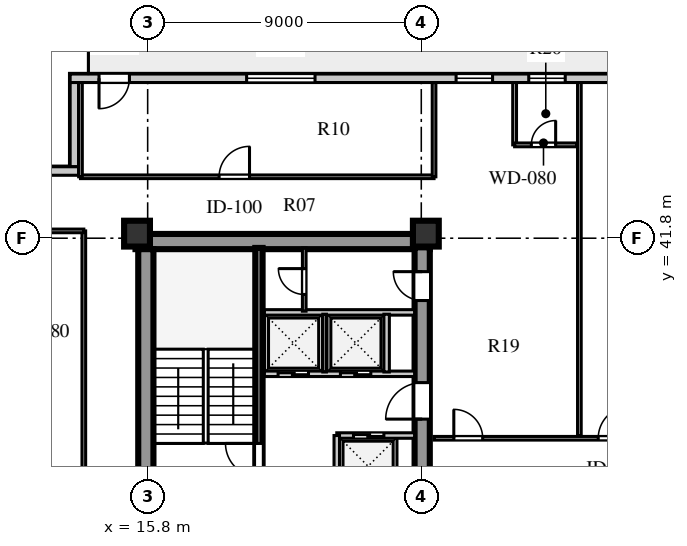
"""IFC4 building model, lengths in metres.
Left out: names, types, materials, properties, quantities, classifications, styles, units other than length and angle.
Written with IfcOpenShell. Run it as: python <this file> out.ifc"""

import sys

from ifc_helpers import new_model, si_unit, direction, frame, frame_2d, origin, origin_2d, place, context, subcontext, project, spatial, rectangle, extrude, element, fill, save


model = new_model("IFC4")
c1 = context("Model", 3, precision=1e-05, world=origin(), true_north=direction((0.0, 1.0)))
c2 = subcontext(c1, "Body", "Model", "MODEL_VIEW")
j1 = project(units=[si_unit("LENGTHUNIT", "METRE"), si_unit("PLANEANGLEUNIT", "RADIAN")], contexts=[c1])
p1 = place(None, origin())
s1 = spatial("IfcSite", under=j1, at=p1, CompositionType="ELEMENT")
p2 = place(p1, origin())
s2 = spatial("IfcBuilding", under=s1, at=p2, CompositionType="ELEMENT")
p3 = place(p2, frame((0.0, 0.0, 111.7)))
s3 = spatial("IfcBuildingStorey", under=s2, at=p3, CompositionType="ELEMENT", Elevation=111.7)
p4 = place(p3, frame((15.4, 41.69, 0.0), z_axis=(0.0, 0.0, 1.0), x_axis=(1.0, 0.0, 0.0)))
e1 = element("IfcWall", 1, at=p4, inside=s3, PredefinedType="SHEAR", context=c2, shape_type="SweptSolid", body=[
    extrude(rectangle(XDim=9.68, YDim=0.5, at=frame_2d((4.84, 0.0))), origin(), (0.0, 0.0, 1.0), 3.6),
])
p5 = place(p3, frame((15.74, 15.81, 0.0), z_axis=(0.0, 0.0, 1.0), x_axis=(0.0, 1.0, 0.0)))
e2 = element("IfcWall", 2, at=p5, inside=s3, PredefinedType="SHEAR", context=c2, shape_type="SweptSolid", body=[
    extrude(rectangle(XDim=25.63, YDim=0.5, at=frame_2d((12.815, 0.0))), origin(), (0.0, 0.0, 1.0), 3.6),
])
p6 = place(p3, frame((24.83, 15.74, 0.0), z_axis=(0.0, 0.0, 1.0), x_axis=(0.0, 1.0, 0.0)))
e3 = element("IfcWall", 3, at=p6, inside=s3, PredefinedType="SHEAR", context=c2, shape_type="SweptSolid", body=[
    extrude(rectangle(XDim=25.76, YDim=0.5, at=frame_2d((12.88, 0.0))), origin(), (0.0, 0.0, 1.0), 3.6),
])
p7 = place(p6, frame((1.61, 0.0, 0.0)))
e4 = element("IfcOpeningElement", 4, at=p7, cuts=e3, PredefinedType="OPENING", context=c2, shape_type="SweptSolid", body=[
    extrude(rectangle(XDim=1.2, YDim=2.1, at=frame_2d((0.6, 1.05))), frame((0.0, 0.26, 0.0), z_axis=(0.0, -1.0, 0.0), x_axis=(1.0, 0.0, 0.0)), (0.0, 0.0, 1.0), 0.52),
])
p8 = place(p6, frame((6.78, 0.0, 0.0)))
e5 = element("IfcOpeningElement", 5, at=p8, cuts=e3, PredefinedType="OPENING", context=c2, shape_type="SweptSolid", body=[
    extrude(rectangle(XDim=0.85, YDim=2.06, at=frame_2d((0.425, 1.03))), frame((0.0, 0.26, 0.0), z_axis=(0.0, -1.0, 0.0), x_axis=(1.0, 0.0, 0.0)), (0.0, 0.0, 1.0), 0.52),
])
p9 = place(p6, frame((12.11, 0.0, 0.0)))
e6 = element("IfcOpeningElement", 6, at=p9, cuts=e3, PredefinedType="OPENING", context=c2, shape_type="SweptSolid", body=[
    extrude(rectangle(XDim=1.5, YDim=2.12, at=frame_2d((0.75, 1.06))), frame((0.0, 0.26, 0.0), z_axis=(0.0, -1.0, 0.0), x_axis=(1.0, 0.0, 0.0)), (0.0, 0.0, 1.0), 0.52),
])
p10 = place(p6, frame((20.11, 0.0, 0.0)))
e7 = element("IfcOpeningElement", 7, at=p10, cuts=e3, PredefinedType="OPENING", context=c2, shape_type="SweptSolid", body=[
    extrude(rectangle(XDim=1.2, YDim=2.12, at=frame_2d((0.6, 1.06))), frame((0.0, 0.26, 0.0), z_axis=(0.0, -1.0, 0.0), x_axis=(1.0, 0.0, 0.0)), (0.0, 0.0, 1.0), 0.52),
])
p11 = place(p6, frame((24.01, 0.0, 0.0)))
e8 = element("IfcOpeningElement", 8, at=p11, cuts=e3, PredefinedType="OPENING", context=c2, shape_type="SweptSolid", body=[
    extrude(rectangle(XDim=0.95, YDim=2.1, at=frame_2d((0.475, 1.05))), frame((0.0, 0.26, 0.0), z_axis=(0.0, -1.0, 0.0), x_axis=(1.0, 0.0, 0.0)), (0.0, 0.0, 1.0), 0.52),
])
for number, where, z_axis, x_axis in (
    (9, (15.45, 41.95, 0.0), (0.0, 0.0, 1.0), (1.0, 0.0, 0.0)),
    (10, (24.95, 41.95, 0.0), (0.0, 0.0, 1.0), (1.0, 0.0, 0.0)),
):
    element("IfcColumn", number, at=place(p3, frame(where, z_axis=z_axis, x_axis=x_axis)), inside=s3, PredefinedType="COLUMN", context=c2, shape_type="SweptSolid", body=[
        extrude(rectangle(XDim=0.85, YDim=0.85, at=origin_2d()), origin(), (0.0, 0.0, 1.0), 3.6),
    ])
p12 = place(p3, frame((45.35, 47.06, 0.0), z_axis=(0.0, 0.0, 1.0), x_axis=(-1.0, 0.0, 0.0)))
e11 = element("IfcWall", 11, at=p12, inside=s3, PredefinedType="STANDARD", context=c2, shape_type="SweptSolid", body=[
    extrude(rectangle(XDim=32.1, YDim=0.28, at=frame_2d((16.05, 0.0))), origin(), (0.0, 0.0, 1.0), 3.6),
])
p13 = place(p12, frame((30.15, 0.0, 0.0)))
e12 = element("IfcOpeningElement", 12, at=p13, cuts=e11, PredefinedType="OPENING", context=c2, shape_type="SweptSolid", body=[
    extrude(rectangle(XDim=1.0, YDim=2.05, at=frame_2d((0.5, 1.025))), frame((0.0, 0.15, 0.0), z_axis=(0.0, -1.0, 0.0), x_axis=(1.0, 0.0, 0.0)), (0.0, 0.0, 1.0), 0.3),
])
p14 = place(p12, frame((24.045, 0.0, 0.8)))
e13 = element("IfcOpeningElement", 13, at=p14, cuts=e11, PredefinedType="OPENING", context=c2, shape_type="SweptSolid", body=[
    extrude(rectangle(XDim=2.25, YDim=2.0, at=frame_2d((1.125, 1.0))), frame((0.0, 0.15, 0.0), z_axis=(0.0, -1.0, 0.0), x_axis=(1.0, 0.0, 0.0)), (0.0, 0.0, 1.0), 0.3),
])
p15 = place(p12, frame((18.205, 0.0, 0.8)))
e14 = element("IfcOpeningElement", 14, at=p15, cuts=e11, PredefinedType="OPENING", context=c2, shape_type="SweptSolid", body=[
    extrude(rectangle(XDim=1.2, YDim=1.75, at=frame_2d((0.6, 0.875))), frame((0.0, 0.15, 0.0), z_axis=(0.0, -1.0, 0.0), x_axis=(1.0, 0.0, 0.0)), (0.0, 0.0, 1.0), 0.3),
])
p16 = place(p12, frame((15.815, 0.0, 0.8)))
e15 = element("IfcOpeningElement", 15, at=p16, cuts=e11, PredefinedType="OPENING", context=c2, shape_type="SweptSolid", body=[
    extrude(rectangle(XDim=1.2, YDim=1.75, at=frame_2d((0.6, 0.875))), frame((0.0, 0.15, 0.0), z_axis=(0.0, -1.0, 0.0), x_axis=(1.0, 0.0, 0.0)), (0.0, 0.0, 1.0), 0.3),
])
p17 = place(p12, frame((12.39, 0.0, 0.8)))
e16 = element("IfcOpeningElement", 16, at=p17, cuts=e11, PredefinedType="OPENING", context=c2, shape_type="SweptSolid", body=[
    extrude(rectangle(XDim=1.2, YDim=1.75, at=frame_2d((0.6, 0.875))), frame((0.0, 0.15, 0.0), z_axis=(0.0, -1.0, 0.0), x_axis=(1.0, 0.0, 0.0)), (0.0, 0.0, 1.0), 0.3),
])
p18 = place(p12, frame((6.38, 0.0, 0.8)))
e17 = element("IfcOpeningElement", 17, at=p18, cuts=e11, PredefinedType="OPENING", context=c2, shape_type="SweptSolid", body=[
    extrude(rectangle(XDim=2.4, YDim=2.05, at=frame_2d((1.2, 1.025))), frame((0.0, 0.15, 0.0), z_axis=(0.0, -1.0, 0.0), x_axis=(1.0, 0.0, 0.0)), (0.0, 0.0, 1.0), 0.3),
])
p19 = place(p12, frame((1.27, 0.0, 0.8)))
e18 = element("IfcOpeningElement", 18, at=p19, cuts=e11, PredefinedType="OPENING", context=c2, shape_type="SweptSolid", body=[
    extrude(rectangle(XDim=2.1, YDim=1.95, at=frame_2d((1.05, 0.975))), frame((0.0, 0.15, 0.0), z_axis=(0.0, -1.0, 0.0), x_axis=(1.0, 0.0, 0.0)), (0.0, 0.0, 1.0), 0.3),
])
p20 = place(p3, frame((13.39, 46.92, 0.0), z_axis=(0.0, 0.0, 1.0), x_axis=(0.0, -1.0, 0.0)))
e19 = element("IfcWall", 19, at=p20, inside=s3, PredefinedType="STANDARD", context=c2, shape_type="SweptSolid", body=[
    extrude(rectangle(XDim=2.77, YDim=0.28, at=frame_2d((1.385, 0.0))), origin(), (0.0, 0.0, 1.0), 3.6),
])
p21 = place(p3, frame((13.53, 44.01, 0.0), z_axis=(0.0, 0.0, 1.0), x_axis=(-1.0, 0.0, 0.0)))
e20 = element("IfcWall", 20, at=p21, inside=s3, PredefinedType="STANDARD", context=c2, shape_type="SweptSolid", body=[
    extrude(rectangle(XDim=3.33, YDim=0.28, at=frame_2d((1.665, 0.0))), origin(), (0.0, 0.0, 1.0), 3.6),
])
p22 = place(p3, frame((19.46, 33.3, 0.0), z_axis=(0.0, 0.0, 1.0), x_axis=(0.0, 1.0, 0.0)))
e21 = element("IfcWall", 21, at=p22, inside=s3, PredefinedType="SHEAR", context=c2, shape_type="SweptSolid", body=[
    extrude(rectangle(XDim=8.18, YDim=0.24, at=frame_2d((4.09, 0.0))), origin(), (0.0, 0.0, 1.0), 3.85),
])
p23 = place(p22, frame((0.65, 0.0, 0.0)))
e22 = element("IfcOpeningElement", 22, at=p23, cuts=e21, PredefinedType="OPENING", context=c2, shape_type="SweptSolid", body=[
    extrude(rectangle(XDim=1.1, YDim=2.1, at=frame_2d((0.55, 1.05))), frame((0.0, 0.13, 0.0), z_axis=(0.0, -1.0, 0.0), x_axis=(1.0, 0.0, 0.0)), (0.0, 0.0, 1.0), 0.26),
])
p24 = place(p3, frame((22.02, 35.31, 0.0), z_axis=(0.0, 0.0, 1.0), x_axis=(1.0, 0.0, 0.0)))
e23 = element("IfcWall", 23, at=p24, inside=s3, PredefinedType="SOLIDWALL", context=c2, shape_type="SweptSolid", body=[
    extrude(rectangle(XDim=2.56, YDim=0.18, at=frame_2d((1.28, 0.0))), origin(), (0.0, 0.0, 1.0), 3.6),
])
p25 = place(p24, frame((0.55, 0.0, 0.0)))
e24 = element("IfcOpeningElement", 24, at=p25, cuts=e23, PredefinedType="OPENING", context=c2, shape_type="SweptSolid", body=[
    extrude(rectangle(XDim=1.0, YDim=2.1, at=frame_2d((0.5, 1.05))), frame((0.0, 0.1, 0.0), z_axis=(0.0, -1.0, 0.0), x_axis=(1.0, 0.0, 0.0)), (0.0, 0.0, 1.0), 0.2),
])
p26 = place(p3, frame((22.02, 33.3, 0.0), z_axis=(0.0, 0.0, 1.0), x_axis=(0.0, 1.0, 0.0)))
e25 = element("IfcWall", 25, at=p26, inside=s3, PredefinedType="SOLIDWALL", context=c2, shape_type="SweptSolid", body=[
    extrude(rectangle(XDim=2.01, YDim=0.18, at=frame_2d((1.005, 0.0))), origin(), (0.0, 0.0, 1.0), 3.6),
])
p27 = place(p3, frame((19.64, 37.34, 0.0), z_axis=(0.0, 0.0, 1.0), x_axis=(1.0, 0.0, 0.0)))
e26 = element("IfcWall", 26, at=p27, inside=s3, PredefinedType="SOLIDWALL", context=c2, shape_type="SweptSolid", body=[
    extrude(rectangle(XDim=4.94, YDim=0.18, at=frame_2d((2.47, 0.0))), origin(), (0.0, 0.0, 1.0), 3.6),
])
p28 = place(p27, frame((0.45, 0.0, 0.0)))
e27 = element("IfcOpeningElement", 27, at=p28, cuts=e26, PredefinedType="OPENING", context=c2, shape_type="SweptSolid", body=[
    extrude(rectangle(XDim=1.0, YDim=2.1, at=frame_2d((0.5, 1.05))), frame((0.0, 0.1, 0.0), z_axis=(0.0, -1.0, 0.0), x_axis=(1.0, 0.0, 0.0)), (0.0, 0.0, 1.0), 0.2),
])
p29 = place(p27, frame((2.5, 0.0, 0.0)))
e28 = element("IfcOpeningElement", 28, at=p29, cuts=e26, PredefinedType="OPENING", context=c2, shape_type="SweptSolid", body=[
    extrude(rectangle(XDim=1.0, YDim=2.1, at=frame_2d((0.5, 1.05))), frame((0.0, 0.1, 0.0), z_axis=(0.0, -1.0, 0.0), x_axis=(1.0, 0.0, 0.0)), (0.0, 0.0, 1.0), 0.2),
])
p30 = place(p3, frame((19.64, 39.36, 0.0), z_axis=(0.0, 0.0, 1.0), x_axis=(1.0, 0.0, 0.0)))
e29 = element("IfcWall", 29, at=p30, inside=s3, PredefinedType="SOLIDWALL", context=c2, shape_type="SweptSolid", body=[
    extrude(rectangle(XDim=4.94, YDim=0.18, at=frame_2d((2.47, 0.0))), origin(), (0.0, 0.0, 1.0), 3.6),
])
p31 = place(p3, frame((21.62, 37.4, 0.0), z_axis=(0.0, 0.0, 1.0), x_axis=(0.0, 1.0, 0.0)))
e30 = element("IfcWall", 30, at=p31, inside=s3, PredefinedType="PARTITIONING", context=c2, shape_type="SweptSolid", body=[
    extrude(rectangle(XDim=1.9, YDim=0.12, at=frame_2d((0.95, 0.0))), origin(), (0.0, 0.0, 1.0), 3.6),
])
p32 = place(p3, frame((23.66, 37.4, 0.0), z_axis=(0.0, 0.0, 1.0), x_axis=(0.0, 1.0, 0.0)))
e31 = element("IfcWall", 31, at=p32, inside=s3, PredefinedType="SOLIDWALL", context=c2, shape_type="SweptSolid", body=[
    extrude(rectangle(XDim=1.9, YDim=0.18, at=frame_2d((0.95, 0.0))), origin(), (0.0, 0.0, 1.0), 3.6),
])
p33 = place(p3, frame((20.95, 39.4, 0.0), z_axis=(0.0, 0.0, 1.0), x_axis=(0.0, 1.0, 0.0)))
e32 = element("IfcWall", 32, at=p33, inside=s3, PredefinedType="PARTITIONING", context=c2, shape_type="SweptSolid", body=[
    extrude(rectangle(XDim=2.08, YDim=0.12, at=frame_2d((1.04, 0.0))), origin(), (0.0, 0.0, 1.0), 3.6),
])
p34 = place(p33, frame((0.55, 0.0, 0.0)))
e33 = element("IfcOpeningElement", 33, at=p34, cuts=e32, PredefinedType="OPENING", context=c2, shape_type="SweptSolid", body=[
    extrude(rectangle(XDim=0.85, YDim=2.06, at=frame_2d((0.425, 1.03))), frame((0.0, 0.07, 0.0), z_axis=(0.0, -1.0, 0.0), x_axis=(1.0, 0.0, 0.0)), (0.0, 0.0, 1.0), 0.14),
])
p35 = place(p3, frame((25.22, 35.22, 0.0), z_axis=(0.0, 0.0, 1.0), x_axis=(1.0, 0.0, 0.0)))
e34 = element("IfcWall", 34, at=p35, inside=s3, PredefinedType="PARTITIONING", context=c2, shape_type="SweptSolid", body=[
    extrude(rectangle(XDim=9.5, YDim=0.12, at=frame_2d((4.75, 0.0))), origin(), (0.0, 0.0, 1.0), 3.6),
])
p36 = place(p35, frame((0.65, 0.0, 0.0)))
e35 = element("IfcOpeningElement", 35, at=p36, cuts=e34, PredefinedType="OPENING", context=c2, shape_type="SweptSolid", body=[
    extrude(rectangle(XDim=0.95, YDim=2.1, at=frame_2d((0.475, 1.05))), frame((0.0, 0.07, 0.0), z_axis=(0.0, -1.0, 0.0), x_axis=(1.0, 0.0, 0.0)), (0.0, 0.0, 1.0), 0.14),
])
p37 = place(p35, frame((5.4, 0.0, 0.0)))
e36 = element("IfcOpeningElement", 36, at=p37, cuts=e34, PredefinedType="OPENING", context=c2, shape_type="SweptSolid", body=[
    extrude(rectangle(XDim=1.05, YDim=2.1, at=frame_2d((0.525, 1.05))), frame((0.0, 0.07, 0.0), z_axis=(0.0, -1.0, 0.0), x_axis=(1.0, 0.0, 0.0)), (0.0, 0.0, 1.0), 0.14),
])
p38 = place(p3, frame((13.7, 15.16, 0.0), z_axis=(0.0, 0.0, 1.0), x_axis=(0.0, 1.0, 0.0)))
e37 = element("IfcWall", 37, at=p38, inside=s3, PredefinedType="PARTITIONING", context=c2, shape_type="SweptSolid", body=[
    extrude(rectangle(XDim=26.88, YDim=0.12, at=frame_2d((13.44, 0.0))), origin(), (0.0, 0.0, 1.0), 3.6),
])
p39 = place(p38, frame((0.91, 0.0, 0.0)))
e38 = element("IfcOpeningElement", 38, at=p39, cuts=e37, PredefinedType="OPENING", context=c2, shape_type="SweptSolid", body=[
    extrude(rectangle(XDim=0.95, YDim=2.1, at=frame_2d((0.475, 1.05))), frame((0.0, 0.07, 0.0), z_axis=(0.0, -1.0, 0.0), x_axis=(1.0, 0.0, 0.0)), (0.0, 0.0, 1.0), 0.14),
])
p40 = place(p3, frame((10.48, 42.04, 0.0), z_axis=(0.0, 0.0, 1.0), x_axis=(1.0, 0.0, 0.0)))
e39 = element("IfcWall", 39, at=p40, inside=s3, PredefinedType="PARTITIONING", context=c2, shape_type="SweptSolid", body=[
    extrude(rectangle(XDim=3.22, YDim=0.12, at=frame_2d((1.61, 0.0))), origin(), (0.0, 0.0, 1.0), 3.1),
])
p41 = place(p3, frame((13.59, 43.82, 0.0), z_axis=(0.0, 0.0, 1.0), x_axis=(1.0, 0.0, 0.0)))
e40 = element("IfcWall", 40, at=p41, inside=s3, PredefinedType="PARTITIONING", context=c2, shape_type="SweptSolid", body=[
    extrude(rectangle(XDim=11.63, YDim=0.12, at=frame_2d((5.815, 0.0))), origin(), (0.0, 0.0, 1.0), 3.6),
])
p42 = place(p41, frame((4.56, 0.0, 0.0)))
e41 = element("IfcOpeningElement", 41, at=p42, cuts=e40, PredefinedType="OPENING", context=c2, shape_type="SweptSolid", body=[
    extrude(rectangle(XDim=1.0, YDim=2.08, at=frame_2d((0.5, 1.04))), frame((0.0, 0.07, 0.0), z_axis=(0.0, -1.0, 0.0), x_axis=(1.0, 0.0, 0.0)), (0.0, 0.0, 1.0), 0.14),
])
p43 = place(p3, frame((13.59, 43.82, 0.0), z_axis=(0.0, 0.0, 1.0), x_axis=(0.0, 1.0, 0.0)))
e42 = element("IfcWall", 42, at=p43, inside=s3, PredefinedType="PARTITIONING", context=c2, shape_type="SweptSolid", body=[
    extrude(rectangle(XDim=3.1, YDim=0.12, at=frame_2d((1.55, 0.0))), origin(), (0.0, 0.0, 1.0), 3.6),
])
p44 = place(p3, frame((25.22, 43.82, 0.0), z_axis=(0.0, 0.0, 1.0), x_axis=(0.0, 1.0, 0.0)))
e43 = element("IfcWall", 43, at=p44, inside=s3, PredefinedType="PARTITIONING", context=c2, shape_type="SweptSolid", body=[
    extrude(rectangle(XDim=3.1, YDim=0.12, at=frame_2d((1.55, 0.0))), origin(), (0.0, 0.0, 1.0), 3.1),
])
p45 = place(p3, frame((30.0, 35.3, 0.0), z_axis=(0.0, 0.0, 1.0), x_axis=(0.0, 1.0, 0.0)))
e44 = element("IfcWall", 44, at=p45, inside=s3, PredefinedType="PARTITIONING", context=c2, shape_type="SweptSolid", body=[
    extrude(rectangle(XDim=11.62, YDim=0.12, at=frame_2d((5.81, 0.0))), origin(), (0.0, 0.0, 1.0), 3.6),
])
p46 = place(p3, frame((27.87, 44.87, 0.0), z_axis=(0.0, 0.0, 1.0), x_axis=(0.0, 1.0, 0.0)))
e45 = element("IfcWall", 45, at=p46, inside=s3, PredefinedType="PLUMBINGWALL", context=c2, shape_type="SweptSolid", body=[
    extrude(rectangle(XDim=2.05, YDim=0.125, at=frame_2d((1.025, 0.0))), origin(), (0.0, 0.0, 1.0), 3.6),
])
p47 = place(p3, frame((27.87, 44.87, 0.0), z_axis=(0.0, 0.0, 1.0), x_axis=(1.0, 0.0, 0.0)))
e46 = element("IfcWall", 46, at=p47, inside=s3, PredefinedType="PLUMBINGWALL", context=c2, shape_type="SweptSolid", body=[
    extrude(rectangle(XDim=2.05, YDim=0.125, at=frame_2d((1.025, 0.0))), origin(), (0.0, 0.0, 1.0), 3.6),
])
p48 = place(p47, frame((0.55, 0.0, 0.0)))
e47 = element("IfcOpeningElement", 47, at=p48, cuts=e46, PredefinedType="OPENING", context=c2, shape_type="SweptSolid", body=[
    extrude(rectangle(XDim=0.8, YDim=2.05, at=frame_2d((0.4, 1.025))), frame((0.0, 0.073, 0.0), z_axis=(0.0, -1.0, 0.0), x_axis=(1.0, 0.0, 0.0)), (0.0, 0.0, 1.0), 0.145),
])
p49 = place(p13, frame((1.0, 0.0, 0.0), z_axis=(0.0, 0.0, 1.0), x_axis=(-1.0, 0.0, 0.0)))
e48 = element("IfcDoor", 48, at=p49, inside=s3, OperationType="SINGLE_SWING_LEFT", PredefinedType="DOOR", context=c2, shape_type="SweptSolid", body=[
    extrude(rectangle(XDim=1.0, YDim=2.05, at=frame_2d((0.5, 1.025))), frame((0.0, 0.025, 0.0), z_axis=(0.0, -1.0, 0.0), x_axis=(1.0, 0.0, 0.0)), (0.0, 0.0, 1.0), 0.05),
])
fill(e12, e48)
p50 = place(p14, origin())
e49 = element("IfcWindow", 49, at=p50, inside=s3, PartitioningType="SINGLE_PANEL", PredefinedType="WINDOW", context=c2, shape_type="SweptSolid", body=[
    extrude(rectangle(XDim=2.25, YDim=2.0, at=frame_2d((1.125, 1.0))), frame((0.0, 0.03, 0.0), z_axis=(0.0, -1.0, 0.0), x_axis=(1.0, 0.0, 0.0)), (0.0, 0.0, 1.0), 0.06),
])
fill(e13, e49)
p51 = place(p15, origin())
e50 = element("IfcWindow", 50, at=p51, inside=s3, PartitioningType="SINGLE_PANEL", PredefinedType="WINDOW", context=c2, shape_type="SweptSolid", body=[
    extrude(rectangle(XDim=1.2, YDim=1.75, at=frame_2d((0.6, 0.875))), frame((0.0, 0.03, 0.0), z_axis=(0.0, -1.0, 0.0), x_axis=(1.0, 0.0, 0.0)), (0.0, 0.0, 1.0), 0.06),
])
fill(e14, e50)
p52 = place(p16, origin())
e51 = element("IfcWindow", 51, at=p52, inside=s3, PartitioningType="SINGLE_PANEL", PredefinedType="WINDOW", context=c2, shape_type="SweptSolid", body=[
    extrude(rectangle(XDim=1.2, YDim=1.75, at=frame_2d((0.6, 0.875))), frame((0.0, 0.03, 0.0), z_axis=(0.0, -1.0, 0.0), x_axis=(1.0, 0.0, 0.0)), (0.0, 0.0, 1.0), 0.06),
])
fill(e15, e51)
p53 = place(p23, origin())
e52 = element("IfcDoor", 52, at=p53, inside=s3, OperationType="SINGLE_SWING_RIGHT", PredefinedType="DOOR", context=c2, shape_type="SweptSolid", body=[
    extrude(rectangle(XDim=1.1, YDim=2.1, at=frame_2d((0.55, 1.05))), frame((0.0, 0.025, 0.0), z_axis=(0.0, -1.0, 0.0), x_axis=(1.0, 0.0, 0.0)), (0.0, 0.0, 1.0), 0.05),
])
fill(e22, e52)
p54 = place(p10, frame((1.2, 0.0, 0.0), z_axis=(0.0, 0.0, 1.0), x_axis=(-1.0, 0.0, 0.0)))
e53 = element("IfcDoor", 53, at=p54, inside=s3, OperationType="SINGLE_SWING_RIGHT", PredefinedType="DOOR", context=c2, shape_type="SweptSolid", body=[
    extrude(rectangle(XDim=1.2, YDim=2.12, at=frame_2d((0.6, 1.06))), frame((0.0, 0.025, 0.0), z_axis=(0.0, -1.0, 0.0), x_axis=(1.0, 0.0, 0.0)), (0.0, 0.0, 1.0), 0.05),
])
fill(e7, e53)
p55 = place(p28, frame((1.0, 0.0, 0.0), z_axis=(0.0, 0.0, 1.0), x_axis=(-1.0, 0.0, 0.0)))
e54 = element("IfcDoor", 54, at=p55, inside=s3, OperationType="DOUBLE_DOOR_SLIDING", PredefinedType="DOOR", context=c2, shape_type="SweptSolid", body=[
    extrude(rectangle(XDim=1.0, YDim=2.1, at=frame_2d((0.5, 1.05))), frame((0.0, 0.025, 0.0), z_axis=(0.0, -1.0, 0.0), x_axis=(1.0, 0.0, 0.0)), (0.0, 0.0, 1.0), 0.05),
])
fill(e27, e54)
p56 = place(p29, frame((1.0, 0.0, 0.0), z_axis=(0.0, 0.0, 1.0), x_axis=(-1.0, 0.0, 0.0)))
e55 = element("IfcDoor", 55, at=p56, inside=s3, OperationType="DOUBLE_DOOR_SLIDING", PredefinedType="DOOR", context=c2, shape_type="SweptSolid", body=[
    extrude(rectangle(XDim=1.0, YDim=2.1, at=frame_2d((0.5, 1.05))), frame((0.0, 0.025, 0.0), z_axis=(0.0, -1.0, 0.0), x_axis=(1.0, 0.0, 0.0)), (0.0, 0.0, 1.0), 0.05),
])
fill(e28, e55)
p57 = place(p25, origin())
e56 = element("IfcDoor", 56, at=p57, inside=s3, OperationType="DOUBLE_DOOR_SLIDING", PredefinedType="DOOR", context=c2, shape_type="SweptSolid", body=[
    extrude(rectangle(XDim=1.0, YDim=2.1, at=frame_2d((0.5, 1.05))), frame((0.0, 0.025, 0.0), z_axis=(0.0, -1.0, 0.0), x_axis=(1.0, 0.0, 0.0)), (0.0, 0.0, 1.0), 0.05),
])
fill(e24, e56)
p58 = place(p34, origin())
e57 = element("IfcDoor", 57, at=p58, inside=s3, OperationType="SINGLE_SWING_RIGHT", PredefinedType="DOOR", context=c2, shape_type="SweptSolid", body=[
    extrude(rectangle(XDim=0.85, YDim=2.06, at=frame_2d((0.425, 1.03))), frame((0.0, 0.025, 0.0), z_axis=(0.0, -1.0, 0.0), x_axis=(1.0, 0.0, 0.0)), (0.0, 0.0, 1.0), 0.05),
])
fill(e33, e57)
p59 = place(p11, frame((0.95, 0.0, 0.0), z_axis=(0.0, 0.0, 1.0), x_axis=(-1.0, 0.0, 0.0)))
e58 = element("IfcDoor", 58, at=p59, inside=s3, OperationType="SINGLE_SWING_LEFT", PredefinedType="DOOR", context=c2, shape_type="SweptSolid", body=[
    extrude(rectangle(XDim=0.95, YDim=2.1, at=frame_2d((0.475, 1.05))), frame((0.0, 0.025, 0.0), z_axis=(0.0, -1.0, 0.0), x_axis=(1.0, 0.0, 0.0)), (0.0, 0.0, 1.0), 0.05),
])
fill(e8, e58)
p60 = place(p42, origin())
e59 = element("IfcDoor", 59, at=p60, inside=s3, OperationType="SINGLE_SWING_RIGHT", PredefinedType="DOOR", context=c2, shape_type="SweptSolid", body=[
    extrude(rectangle(XDim=1.0, YDim=2.08, at=frame_2d((0.5, 1.04))), frame((0.0, 0.025, 0.0), z_axis=(0.0, -1.0, 0.0), x_axis=(1.0, 0.0, 0.0)), (0.0, 0.0, 1.0), 0.05),
])
fill(e41, e59)
p61 = place(p36, origin())
e60 = element("IfcDoor", 60, at=p61, inside=s3, OperationType="SINGLE_SWING_LEFT", PredefinedType="DOOR", context=c2, shape_type="SweptSolid", body=[
    extrude(rectangle(XDim=0.95, YDim=2.1, at=frame_2d((0.475, 1.05))), frame((0.0, 0.025, 0.0), z_axis=(0.0, -1.0, 0.0), x_axis=(1.0, 0.0, 0.0)), (0.0, 0.0, 1.0), 0.05),
])
fill(e35, e60)
p62 = place(p48, frame((0.8, 0.0, 0.0), z_axis=(0.0, 0.0, 1.0), x_axis=(-1.0, 0.0, 0.0)))
e61 = element("IfcDoor", 61, at=p62, inside=s3, OperationType="SINGLE_SWING_LEFT", PredefinedType="DOOR", context=c2, shape_type="SweptSolid", body=[
    extrude(rectangle(XDim=0.8, YDim=2.05, at=frame_2d((0.4, 1.025))), frame((0.0, 0.025, 0.0), z_axis=(0.0, -1.0, 0.0), x_axis=(1.0, 0.0, 0.0)), (0.0, 0.0, 1.0), 0.05),
])
fill(e47, e61)
p63 = place(p37, origin())
e62 = element("IfcDoor", 62, at=p63, inside=s3, OperationType="SINGLE_SWING_RIGHT", PredefinedType="DOOR", context=c2, shape_type="SweptSolid", body=[
    extrude(rectangle(XDim=1.05, YDim=2.1, at=frame_2d((0.525, 1.05))), frame((0.0, 0.025, 0.0), z_axis=(0.0, -1.0, 0.0), x_axis=(1.0, 0.0, 0.0)), (0.0, 0.0, 1.0), 0.05),
])
fill(e36, e62)
save(model, sys.argv[1])
